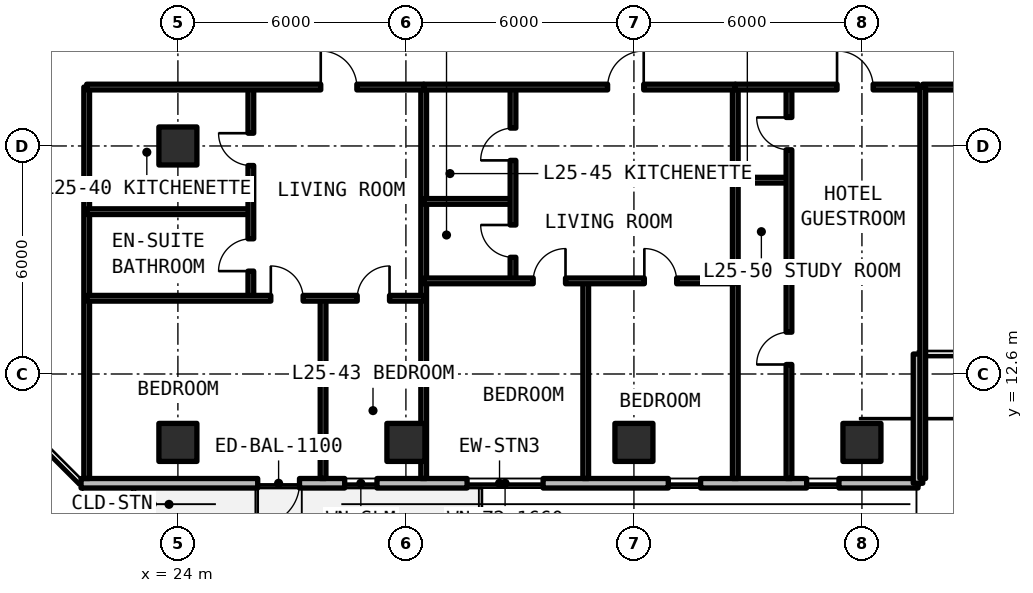
"""IFC4 building model, lengths in metres.
Left out: names, types, materials, properties, quantities, classifications, styles, units other than length and angle.
Written with IfcOpenShell. Run it as: python <this file> out.ifc"""

import sys

from ifc_helpers import new_model, si_unit, direction, frame, frame_2d, origin, origin_2d, place, context, subcontext, project, spatial, rectangle, extrude, element, fill, save


model = new_model("IFC4")
c1 = context("Model", 3, precision=1e-05, world=origin(), true_north=direction((0.0, 1.0)))
c2 = subcontext(c1, "Body", "Model", "MODEL_VIEW")
j1 = project(units=[si_unit("LENGTHUNIT", "METRE"), si_unit("PLANEANGLEUNIT", "RADIAN")], contexts=[c1])
p1 = place(None, origin())
s1 = spatial("IfcSite", under=j1, at=p1, CompositionType="ELEMENT")
p2 = place(p1, origin())
s2 = spatial("IfcBuilding", under=s1, at=p2, CompositionType="ELEMENT")
p3 = place(p2, frame((0.0, 0.0, 92.07)))
s3 = spatial("IfcBuildingStorey", under=s2, at=p3, CompositionType="ELEMENT", Elevation=92.07)
for number, where, z_axis, x_axis in (
    (1, (24.0, 18.6, 0.0), (0.0, 0.0, 1.0), (1.0, 0.0, 0.0)),
    (2, (24.0, 10.8, 0.0), (0.0, 0.0, 1.0), (1.0, 0.0, 0.0)),
    (3, (30.0, 10.8, 0.0), (0.0, 0.0, 1.0), (1.0, 0.0, 0.0)),
    (4, (36.0, 10.8, 0.0), (0.0, 0.0, 1.0), (1.0, 0.0, 0.0)),
    (5, (42.0, 10.8, 0.0), (0.0, 0.0, 1.0), (1.0, 0.0, 0.0)),
):
    element("IfcColumn", number, at=place(p3, frame(where, z_axis=z_axis, x_axis=x_axis)), inside=s3, PredefinedType="COLUMN", context=c2, shape_type="SweptSolid", body=[
        extrude(rectangle(XDim=1.0, YDim=1.0, at=origin_2d()), origin(), (0.0, 0.0, 1.0), 3.3),
    ])
p4 = place(p3, frame((21.452, 9.725, 0.0), z_axis=(0.0, 0.0, 1.0), x_axis=(1.0, 0.0, 0.0)))
e6 = element("IfcWall", 6, at=p4, inside=s3, PredefinedType="SOLIDWALL", context=c2, shape_type="SweptSolid", body=[
    extrude(rectangle(XDim=22.023, YDim=0.25, at=frame_2d((11.012, 0.0))), origin(), (0.0, 0.0, 1.0), 3.08),
])
p5 = place(p4, frame((4.648, 0.0, 0.0)))
e7 = element("IfcOpeningElement", 7, at=p5, cuts=e6, PredefinedType="OPENING", context=c2, shape_type="SweptSolid", body=[
    extrude(rectangle(XDim=1.1, YDim=2.15, at=frame_2d((0.55, 1.075))), frame((0.0, 0.135, 0.0), z_axis=(0.0, -1.0, 0.0), x_axis=(1.0, 0.0, 0.0)), (0.0, 0.0, 1.0), 0.27),
])
p6 = place(p4, frame((6.937, 0.0, 0.78)))
e8 = element("IfcOpeningElement", 8, at=p6, cuts=e6, PredefinedType="OPENING", context=c2, shape_type="SweptSolid", body=[
    extrude(rectangle(XDim=0.85, YDim=1.65, at=frame_2d((0.425, 0.825))), frame((0.0, 0.135, 0.0), z_axis=(0.0, -1.0, 0.0), x_axis=(1.0, 0.0, 0.0)), (0.0, 0.0, 1.0), 0.27),
])
p7 = place(p4, frame((10.158, 0.0, 0.78)))
e9 = element("IfcOpeningElement", 9, at=p7, cuts=e6, PredefinedType="OPENING", context=c2, shape_type="SweptSolid", body=[
    extrude(rectangle(XDim=2.0, YDim=1.66, at=frame_2d((1.0, 0.83))), frame((0.0, 0.135, 0.0), z_axis=(0.0, -1.0, 0.0), x_axis=(1.0, 0.0, 0.0)), (0.0, 0.0, 1.0), 0.27),
])
p8 = place(p4, frame((15.453, 0.0, 0.78)))
e10 = element("IfcOpeningElement", 10, at=p8, cuts=e6, PredefinedType="OPENING", context=c2, shape_type="SweptSolid", body=[
    extrude(rectangle(XDim=0.85, YDim=1.65, at=frame_2d((0.425, 0.825))), frame((0.0, 0.135, 0.0), z_axis=(0.0, -1.0, 0.0), x_axis=(1.0, 0.0, 0.0)), (0.0, 0.0, 1.0), 0.27),
])
p9 = place(p4, frame((19.093, 0.0, 0.78)))
e11 = element("IfcOpeningElement", 11, at=p9, cuts=e6, PredefinedType="OPENING", context=c2, shape_type="SweptSolid", body=[
    extrude(rectangle(XDim=0.85, YDim=1.65, at=frame_2d((0.425, 0.825))), frame((0.0, 0.135, 0.0), z_axis=(0.0, -1.0, 0.0), x_axis=(1.0, 0.0, 0.0)), (0.0, 0.0, 1.0), 0.27),
])
p10 = place(p3, frame((43.475, 9.725, 0.0), z_axis=(0.0, 0.0, 1.0), x_axis=(0.0, 1.0, 0.0)))
e12 = element("IfcWall", 12, at=p10, inside=s3, PredefinedType="SOLIDWALL", context=c2, shape_type="SweptSolid", body=[
    extrude(rectangle(XDim=3.4, YDim=0.25, at=frame_2d((1.7, 0.0))), origin(), (0.0, 0.0, 1.0), 3.08),
])
p11 = place(p3, frame((43.6, 20.15, 0.0), z_axis=(0.0, 0.0, 1.0), x_axis=(1.0, 0.0, 0.0)))
e13 = element("IfcWall", 13, at=p11, inside=s3, PredefinedType="SOLIDWALL", context=c2, shape_type="SweptSolid", body=[
    extrude(rectangle(XDim=8.4, YDim=0.15, at=frame_2d((4.2, 0.0))), origin(), (0.0, 0.0, 1.0), 2.35),
])
p12 = place(p11, frame((3.65, 0.0, 0.0)))
e14 = element("IfcOpeningElement", 14, at=p12, cuts=e13, PredefinedType="OPENING", context=c2, shape_type="SweptSolid", body=[
    extrude(rectangle(XDim=1.1, YDim=2.15, at=frame_2d((0.55, 1.075))), frame((0.0, 0.085, 0.0), z_axis=(0.0, -1.0, 0.0), x_axis=(1.0, 0.0, 0.0)), (0.0, 0.0, 1.0), 0.17),
])
for number, where, z_axis, x_axis in (
    (15, (43.6, 9.85, 0.0), (0.0, 0.0, 1.0), (0.0, 1.0, 0.0)),
    (16, (21.6, 9.85, 0.0), (0.0, 0.0, 1.0), (0.0, 1.0, 0.0)),
    (17, (30.468, 9.85, 0.0), (0.0, 0.0, 1.0), (0.0, 1.0, 0.0)),
):
    element("IfcWall", number, at=place(p3, frame(where, z_axis=z_axis, x_axis=x_axis)), inside=s3, PredefinedType="SOLIDWALL", context=c2, shape_type="SweptSolid", body=[
        extrude(rectangle(XDim=10.3, YDim=0.15, at=frame_2d((5.15, 0.0))), origin(), (0.0, 0.0, 1.0), 2.35),
    ])
p13 = place(p3, frame((21.6, 16.871, 0.0), z_axis=(0.0, 0.0, 1.0), x_axis=(1.0, 0.0, 0.0)))
e18 = element("IfcWall", 18, at=p13, inside=s3, PredefinedType="PARTITIONING", context=c2, shape_type="SweptSolid", body=[
    extrude(rectangle(XDim=4.32, YDim=0.15, at=frame_2d((2.16, 0.0))), origin(), (0.0, 0.0, 1.0), 2.35),
])
p14 = place(p3, frame((25.92, 14.593, 0.0), z_axis=(0.0, 0.0, 1.0), x_axis=(0.0, 1.0, 0.0)))
e19 = element("IfcWall", 19, at=p14, inside=s3, PredefinedType="PARTITIONING", context=c2, shape_type="SweptSolid", body=[
    extrude(rectangle(XDim=5.557, YDim=0.15, at=frame_2d((2.779, 0.0))), origin(), (0.0, 0.0, 1.0), 2.35),
])
p15 = place(p14, frame((0.714, 0.0, 0.0)))
e20 = element("IfcOpeningElement", 20, at=p15, cuts=e19, PredefinedType="OPENING", context=c2, shape_type="SweptSolid", body=[
    extrude(rectangle(XDim=0.85, YDim=2.1, at=frame_2d((0.425, 1.05))), frame((0.0, 0.085, 0.0), z_axis=(0.0, -1.0, 0.0), x_axis=(1.0, 0.0, 0.0)), (0.0, 0.0, 1.0), 0.17),
])
p16 = place(p14, frame((3.493, 0.0, 0.0)))
e21 = element("IfcOpeningElement", 21, at=p16, cuts=e19, PredefinedType="OPENING", context=c2, shape_type="SweptSolid", body=[
    extrude(rectangle(XDim=0.85, YDim=2.1, at=frame_2d((0.425, 1.05))), frame((0.0, 0.085, 0.0), z_axis=(0.0, -1.0, 0.0), x_axis=(1.0, 0.0, 0.0)), (0.0, 0.0, 1.0), 0.17),
])
p17 = place(p3, frame((27.82, 9.85, 0.0), z_axis=(0.0, 0.0, 1.0), x_axis=(0.0, 1.0, 0.0)))
e22 = element("IfcWall", 22, at=p17, inside=s3, PredefinedType="PARTITIONING", context=c2, shape_type="SweptSolid", body=[
    extrude(rectangle(XDim=4.743, YDim=0.15, at=frame_2d((2.371, 0.0))), origin(), (0.0, 0.0, 1.0), 2.35),
])
p18 = place(p3, frame((21.6, 14.593, 0.0), z_axis=(0.0, 0.0, 1.0), x_axis=(1.0, 0.0, 0.0)))
e23 = element("IfcWall", 23, at=p18, inside=s3, PredefinedType="PARTITIONING", context=c2, shape_type="SweptSolid", body=[
    extrude(rectangle(XDim=8.868, YDim=0.15, at=frame_2d((4.434, 0.0))), origin(), (0.0, 0.0, 1.0), 2.35),
])
p19 = place(p18, frame((4.845, 0.0, 0.0)))
e24 = element("IfcOpeningElement", 24, at=p19, cuts=e23, PredefinedType="OPENING", context=c2, shape_type="SweptSolid", body=[
    extrude(rectangle(XDim=0.85, YDim=2.1, at=frame_2d((0.425, 1.05))), frame((0.0, 0.085, 0.0), z_axis=(0.0, -1.0, 0.0), x_axis=(1.0, 0.0, 0.0)), (0.0, 0.0, 1.0), 0.17),
])
p20 = place(p18, frame((7.119, 0.0, 0.0)))
e25 = element("IfcOpeningElement", 25, at=p20, cuts=e23, PredefinedType="OPENING", context=c2, shape_type="SweptSolid", body=[
    extrude(rectangle(XDim=0.85, YDim=2.1, at=frame_2d((0.425, 1.05))), frame((0.0, 0.085, 0.0), z_axis=(0.0, -1.0, 0.0), x_axis=(1.0, 0.0, 0.0)), (0.0, 0.0, 1.0), 0.17),
])
p21 = place(p3, frame((21.6, 20.15, 0.0), z_axis=(0.0, 0.0, 1.0), x_axis=(1.0, 0.0, 0.0)))
e26 = element("IfcWall", 26, at=p21, inside=s3, PredefinedType="SOLIDWALL", context=c2, shape_type="SweptSolid", body=[
    extrude(rectangle(XDim=8.868, YDim=0.15, at=frame_2d((4.434, 0.0))), origin(), (0.0, 0.0, 1.0), 2.35),
])
p22 = place(p21, frame((6.159, 0.0, 0.0)))
e27 = element("IfcOpeningElement", 27, at=p22, cuts=e26, PredefinedType="OPENING", context=c2, shape_type="SweptSolid", body=[
    extrude(rectangle(XDim=0.95, YDim=2.15, at=frame_2d((0.475, 1.075))), frame((0.0, 0.085, 0.0), z_axis=(0.0, -1.0, 0.0), x_axis=(1.0, 0.0, 0.0)), (0.0, 0.0, 1.0), 0.17),
])
p23 = place(p3, frame((38.667, 9.85, 0.0), z_axis=(0.0, 0.0, 1.0), x_axis=(0.0, 1.0, 0.0)))
e28 = element("IfcWall", 28, at=p23, inside=s3, PredefinedType="SOLIDWALL", context=c2, shape_type="SweptSolid", body=[
    extrude(rectangle(XDim=10.3, YDim=0.15, at=frame_2d((5.15, 0.0))), origin(), (0.0, 0.0, 1.0), 2.35),
])
p24 = place(p3, frame((30.468, 17.141, 0.0), z_axis=(0.0, 0.0, 1.0), x_axis=(1.0, 0.0, 0.0)))
e29 = element("IfcWall", 29, at=p24, inside=s3, PredefinedType="PARTITIONING", context=c2, shape_type="SweptSolid", body=[
    extrude(rectangle(XDim=2.35, YDim=0.15, at=frame_2d((1.175, 0.0))), origin(), (0.0, 0.0, 1.0), 2.35),
])
p25 = place(p3, frame((32.818, 15.05, 0.0), z_axis=(0.0, 0.0, 1.0), x_axis=(0.0, 1.0, 0.0)))
e30 = element("IfcWall", 30, at=p25, inside=s3, PredefinedType="PARTITIONING", context=c2, shape_type="SweptSolid", body=[
    extrude(rectangle(XDim=5.1, YDim=0.15, at=frame_2d((2.55, 0.0))), origin(), (0.0, 0.0, 1.0), 2.35),
])
p26 = place(p25, frame((0.621, 0.0, 0.0)))
e31 = element("IfcOpeningElement", 31, at=p26, cuts=e30, PredefinedType="OPENING", context=c2, shape_type="SweptSolid", body=[
    extrude(rectangle(XDim=0.85, YDim=2.1, at=frame_2d((0.425, 1.05))), frame((0.0, 0.085, 0.0), z_axis=(0.0, -1.0, 0.0), x_axis=(1.0, 0.0, 0.0)), (0.0, 0.0, 1.0), 0.17),
])
p27 = place(p25, frame((3.17, 0.0, 0.0)))
e32 = element("IfcOpeningElement", 32, at=p27, cuts=e30, PredefinedType="OPENING", context=c2, shape_type="SweptSolid", body=[
    extrude(rectangle(XDim=0.85, YDim=2.1, at=frame_2d((0.425, 1.05))), frame((0.0, 0.085, 0.0), z_axis=(0.0, -1.0, 0.0), x_axis=(1.0, 0.0, 0.0)), (0.0, 0.0, 1.0), 0.17),
])
p28 = place(p3, frame((34.732, 9.85, 0.0), z_axis=(0.0, 0.0, 1.0), x_axis=(0.0, 1.0, 0.0)))
e33 = element("IfcWall", 33, at=p28, inside=s3, PredefinedType="PARTITIONING", context=c2, shape_type="SweptSolid", body=[
    extrude(rectangle(XDim=5.2, YDim=0.15, at=frame_2d((2.6, 0.0))), origin(), (0.0, 0.0, 1.0), 2.35),
])
p29 = place(p3, frame((30.468, 15.05, 0.0), z_axis=(0.0, 0.0, 1.0), x_axis=(1.0, 0.0, 0.0)))
e34 = element("IfcWall", 34, at=p29, inside=s3, PredefinedType="PARTITIONING", context=c2, shape_type="SweptSolid", body=[
    extrude(rectangle(XDim=8.199, YDim=0.15, at=frame_2d((4.1, 0.0))), origin(), (0.0, 0.0, 1.0), 2.35),
])
p30 = place(p29, frame((2.882, 0.0, 0.0)))
e35 = element("IfcOpeningElement", 35, at=p30, cuts=e34, PredefinedType="OPENING", context=c2, shape_type="SweptSolid", body=[
    extrude(rectangle(XDim=0.85, YDim=2.1, at=frame_2d((0.425, 1.05))), frame((0.0, 0.085, 0.0), z_axis=(0.0, -1.0, 0.0), x_axis=(1.0, 0.0, 0.0)), (0.0, 0.0, 1.0), 0.17),
])
p31 = place(p29, frame((5.806, 0.0, 0.0)))
e36 = element("IfcOpeningElement", 36, at=p31, cuts=e34, PredefinedType="OPENING", context=c2, shape_type="SweptSolid", body=[
    extrude(rectangle(XDim=0.85, YDim=2.1, at=frame_2d((0.425, 1.05))), frame((0.0, 0.085, 0.0), z_axis=(0.0, -1.0, 0.0), x_axis=(1.0, 0.0, 0.0)), (0.0, 0.0, 1.0), 0.17),
])
p32 = place(p3, frame((30.468, 20.15, 0.0), z_axis=(0.0, 0.0, 1.0), x_axis=(1.0, 0.0, 0.0)))
e37 = element("IfcWall", 37, at=p32, inside=s3, PredefinedType="SOLIDWALL", context=c2, shape_type="SweptSolid", body=[
    extrude(rectangle(XDim=8.199, YDim=0.15, at=frame_2d((4.1, 0.0))), origin(), (0.0, 0.0, 1.0), 2.35),
])
p33 = place(p32, frame((4.84, 0.0, 0.0)))
e38 = element("IfcOpeningElement", 38, at=p33, cuts=e37, PredefinedType="OPENING", context=c2, shape_type="SweptSolid", body=[
    extrude(rectangle(XDim=0.95, YDim=2.15, at=frame_2d((0.475, 1.075))), frame((0.0, 0.085, 0.0), z_axis=(0.0, -1.0, 0.0), x_axis=(1.0, 0.0, 0.0)), (0.0, 0.0, 1.0), 0.17),
])
p34 = place(p3, frame((38.667, 17.7, 0.0), z_axis=(0.0, 0.0, 1.0), x_axis=(1.0, 0.0, 0.0)))
e39 = element("IfcWall", 39, at=p34, inside=s3, PredefinedType="PARTITIONING", context=c2, shape_type="SweptSolid", body=[
    extrude(rectangle(XDim=1.413, YDim=0.15, at=frame_2d((0.707, 0.0))), origin(), (0.0, 0.0, 1.0), 2.35),
])
p35 = place(p3, frame((40.08, 9.85, 0.0), z_axis=(0.0, 0.0, 1.0), x_axis=(0.0, 1.0, 0.0)))
e40 = element("IfcWall", 40, at=p35, inside=s3, PredefinedType="PARTITIONING", context=c2, shape_type="SweptSolid", body=[
    extrude(rectangle(XDim=10.3, YDim=0.15, at=frame_2d((5.15, 0.0))), origin(), (0.0, 0.0, 1.0), 2.35),
])
p36 = place(p35, frame((3.0, 0.0, 0.0)))
e41 = element("IfcOpeningElement", 41, at=p36, cuts=e40, PredefinedType="OPENING", context=c2, shape_type="SweptSolid", body=[
    extrude(rectangle(XDim=0.85, YDim=2.1, at=frame_2d((0.425, 1.05))), frame((0.0, 0.085, 0.0), z_axis=(0.0, -1.0, 0.0), x_axis=(1.0, 0.0, 0.0)), (0.0, 0.0, 1.0), 0.17),
])
p37 = place(p35, frame((8.65, 0.0, 0.0)))
e42 = element("IfcOpeningElement", 42, at=p37, cuts=e40, PredefinedType="OPENING", context=c2, shape_type="SweptSolid", body=[
    extrude(rectangle(XDim=0.85, YDim=2.1, at=frame_2d((0.425, 1.05))), frame((0.0, 0.085, 0.0), z_axis=(0.0, -1.0, 0.0), x_axis=(1.0, 0.0, 0.0)), (0.0, 0.0, 1.0), 0.17),
])
p38 = place(p3, frame((38.667, 20.15, 0.0), z_axis=(0.0, 0.0, 1.0), x_axis=(1.0, 0.0, 0.0)))
e43 = element("IfcWall", 43, at=p38, inside=s3, PredefinedType="SOLIDWALL", context=c2, shape_type="SweptSolid", body=[
    extrude(rectangle(XDim=4.813, YDim=0.15, at=frame_2d((2.406, 0.0))), origin(), (0.0, 0.0, 1.0), 2.35),
])
p39 = place(p38, frame((2.678, 0.0, 0.0)))
e44 = element("IfcOpeningElement", 44, at=p39, cuts=e43, PredefinedType="OPENING", context=c2, shape_type="SweptSolid", body=[
    extrude(rectangle(XDim=0.95, YDim=2.15, at=frame_2d((0.475, 1.075))), frame((0.0, 0.085, 0.0), z_axis=(0.0, -1.0, 0.0), x_axis=(1.0, 0.0, 0.0)), (0.0, 0.0, 1.0), 0.17),
])
p40 = place(p5, frame((1.1, 0.0, 0.0), z_axis=(0.0, 0.0, 1.0), x_axis=(-1.0, 0.0, 0.0)))
e45 = element("IfcDoor", 45, at=p40, inside=s3, OperationType="SINGLE_SWING_RIGHT", PredefinedType="DOOR", context=c2, shape_type="SweptSolid", body=[
    extrude(rectangle(XDim=1.1, YDim=2.15, at=frame_2d((0.55, 1.075))), frame((0.0, 0.025, 0.0), z_axis=(0.0, -1.0, 0.0), x_axis=(1.0, 0.0, 0.0)), (0.0, 0.0, 1.0), 0.05),
])
fill(e7, e45)
p41 = place(p6, origin())
e46 = element("IfcWindow", 46, at=p41, inside=s3, PartitioningType="SINGLE_PANEL", PredefinedType="WINDOW", context=c2, shape_type="SweptSolid", body=[
    extrude(rectangle(XDim=0.85, YDim=1.65, at=frame_2d((0.425, 0.825))), frame((0.0, 0.03, 0.0), z_axis=(0.0, -1.0, 0.0), x_axis=(1.0, 0.0, 0.0)), (0.0, 0.0, 1.0), 0.06),
])
fill(e8, e46)
p42 = place(p7, origin())
e47 = element("IfcWindow", 47, at=p42, inside=s3, PartitioningType="SINGLE_PANEL", PredefinedType="WINDOW", context=c2, shape_type="SweptSolid", body=[
    extrude(rectangle(XDim=2.0, YDim=1.66, at=frame_2d((1.0, 0.83))), frame((0.0, 0.03, 0.0), z_axis=(0.0, -1.0, 0.0), x_axis=(1.0, 0.0, 0.0)), (0.0, 0.0, 1.0), 0.06),
])
fill(e9, e47)
p43 = place(p8, origin())
e48 = element("IfcWindow", 48, at=p43, inside=s3, PartitioningType="SINGLE_PANEL", PredefinedType="WINDOW", context=c2, shape_type="SweptSolid", body=[
    extrude(rectangle(XDim=0.85, YDim=1.65, at=frame_2d((0.425, 0.825))), frame((0.0, 0.03, 0.0), z_axis=(0.0, -1.0, 0.0), x_axis=(1.0, 0.0, 0.0)), (0.0, 0.0, 1.0), 0.06),
])
fill(e10, e48)
p44 = place(p9, origin())
e49 = element("IfcWindow", 49, at=p44, inside=s3, PartitioningType="SINGLE_PANEL", PredefinedType="WINDOW", context=c2, shape_type="SweptSolid", body=[
    extrude(rectangle(XDim=0.85, YDim=1.65, at=frame_2d((0.425, 0.825))), frame((0.0, 0.03, 0.0), z_axis=(0.0, -1.0, 0.0), x_axis=(1.0, 0.0, 0.0)), (0.0, 0.0, 1.0), 0.06),
])
fill(e11, e49)
p45 = place(p15, origin())
e50 = element("IfcDoor", 50, at=p45, inside=s3, OperationType="SINGLE_SWING_LEFT", PredefinedType="DOOR", context=c2, shape_type="SweptSolid", body=[
    extrude(rectangle(XDim=0.85, YDim=2.1, at=frame_2d((0.425, 1.05))), frame((0.0, 0.025, 0.0), z_axis=(0.0, -1.0, 0.0), x_axis=(1.0, 0.0, 0.0)), (0.0, 0.0, 1.0), 0.05),
])
fill(e20, e50)
p46 = place(p16, origin())
e51 = element("IfcDoor", 51, at=p46, inside=s3, OperationType="SINGLE_SWING_RIGHT", PredefinedType="DOOR", context=c2, shape_type="SweptSolid", body=[
    extrude(rectangle(XDim=0.85, YDim=2.1, at=frame_2d((0.425, 1.05))), frame((0.0, 0.025, 0.0), z_axis=(0.0, -1.0, 0.0), x_axis=(1.0, 0.0, 0.0)), (0.0, 0.0, 1.0), 0.05),
])
fill(e21, e51)
p47 = place(p19, origin())
e52 = element("IfcDoor", 52, at=p47, inside=s3, OperationType="SINGLE_SWING_LEFT", PredefinedType="DOOR", context=c2, shape_type="SweptSolid", body=[
    extrude(rectangle(XDim=0.85, YDim=2.1, at=frame_2d((0.425, 1.05))), frame((0.0, 0.025, 0.0), z_axis=(0.0, -1.0, 0.0), x_axis=(1.0, 0.0, 0.0)), (0.0, 0.0, 1.0), 0.05),
])
fill(e24, e52)
p48 = place(p20, origin())
e53 = element("IfcDoor", 53, at=p48, inside=s3, OperationType="SINGLE_SWING_RIGHT", PredefinedType="DOOR", context=c2, shape_type="SweptSolid", body=[
    extrude(rectangle(XDim=0.85, YDim=2.1, at=frame_2d((0.425, 1.05))), frame((0.0, 0.025, 0.0), z_axis=(0.0, -1.0, 0.0), x_axis=(1.0, 0.0, 0.0)), (0.0, 0.0, 1.0), 0.05),
])
fill(e25, e53)
p49 = place(p22, origin())
e54 = element("IfcDoor", 54, at=p49, inside=s3, OperationType="SINGLE_SWING_LEFT", PredefinedType="DOOR", context=c2, shape_type="SweptSolid", body=[
    extrude(rectangle(XDim=0.95, YDim=2.15, at=frame_2d((0.475, 1.075))), frame((0.0, 0.025, 0.0), z_axis=(0.0, -1.0, 0.0), x_axis=(1.0, 0.0, 0.0)), (0.0, 0.0, 1.0), 0.05),
])
fill(e27, e54)
p50 = place(p26, origin())
e55 = element("IfcDoor", 55, at=p50, inside=s3, OperationType="SINGLE_SWING_RIGHT", PredefinedType="DOOR", context=c2, shape_type="SweptSolid", body=[
    extrude(rectangle(XDim=0.85, YDim=2.1, at=frame_2d((0.425, 1.05))), frame((0.0, 0.025, 0.0), z_axis=(0.0, -1.0, 0.0), x_axis=(1.0, 0.0, 0.0)), (0.0, 0.0, 1.0), 0.05),
])
fill(e31, e55)
p51 = place(p27, origin())
e56 = element("IfcDoor", 56, at=p51, inside=s3, OperationType="SINGLE_SWING_LEFT", PredefinedType="DOOR", context=c2, shape_type="SweptSolid", body=[
    extrude(rectangle(XDim=0.85, YDim=2.1, at=frame_2d((0.425, 1.05))), frame((0.0, 0.025, 0.0), z_axis=(0.0, -1.0, 0.0), x_axis=(1.0, 0.0, 0.0)), (0.0, 0.0, 1.0), 0.05),
])
fill(e32, e56)
p52 = place(p30, origin())
e57 = element("IfcDoor", 57, at=p52, inside=s3, OperationType="SINGLE_SWING_RIGHT", PredefinedType="DOOR", context=c2, shape_type="SweptSolid", body=[
    extrude(rectangle(XDim=0.85, YDim=2.1, at=frame_2d((0.425, 1.05))), frame((0.0, 0.025, 0.0), z_axis=(0.0, -1.0, 0.0), x_axis=(1.0, 0.0, 0.0)), (0.0, 0.0, 1.0), 0.05),
])
fill(e35, e57)
p53 = place(p31, origin())
e58 = element("IfcDoor", 58, at=p53, inside=s3, OperationType="SINGLE_SWING_LEFT", PredefinedType="DOOR", context=c2, shape_type="SweptSolid", body=[
    extrude(rectangle(XDim=0.85, YDim=2.1, at=frame_2d((0.425, 1.05))), frame((0.0, 0.025, 0.0), z_axis=(0.0, -1.0, 0.0), x_axis=(1.0, 0.0, 0.0)), (0.0, 0.0, 1.0), 0.05),
])
fill(e36, e58)
p54 = place(p33, origin())
e59 = element("IfcDoor", 59, at=p54, inside=s3, OperationType="SINGLE_SWING_RIGHT", PredefinedType="DOOR", context=c2, shape_type="SweptSolid", body=[
    extrude(rectangle(XDim=0.95, YDim=2.15, at=frame_2d((0.475, 1.075))), frame((0.0, 0.025, 0.0), z_axis=(0.0, -1.0, 0.0), x_axis=(1.0, 0.0, 0.0)), (0.0, 0.0, 1.0), 0.05),
])
fill(e38, e59)
p55 = place(p36, origin())
e60 = element("IfcDoor", 60, at=p55, inside=s3, OperationType="SINGLE_SWING_LEFT", PredefinedType="DOOR", context=c2, shape_type="SweptSolid", body=[
    extrude(rectangle(XDim=0.85, YDim=2.1, at=frame_2d((0.425, 1.05))), frame((0.0, 0.025, 0.0), z_axis=(0.0, -1.0, 0.0), x_axis=(1.0, 0.0, 0.0)), (0.0, 0.0, 1.0), 0.05),
])
fill(e41, e60)
p56 = place(p37, origin())
e61 = element("IfcDoor", 61, at=p56, inside=s3, OperationType="SINGLE_SWING_RIGHT", PredefinedType="DOOR", context=c2, shape_type="SweptSolid", body=[
    extrude(rectangle(XDim=0.85, YDim=2.1, at=frame_2d((0.425, 1.05))), frame((0.0, 0.025, 0.0), z_axis=(0.0, -1.0, 0.0), x_axis=(1.0, 0.0, 0.0)), (0.0, 0.0, 1.0), 0.05),
])
fill(e42, e61)
p57 = place(p39, origin())
e62 = element("IfcDoor", 62, at=p57, inside=s3, OperationType="SINGLE_SWING_LEFT", PredefinedType="DOOR", context=c2, shape_type="SweptSolid", body=[
    extrude(rectangle(XDim=0.95, YDim=2.15, at=frame_2d((0.475, 1.075))), frame((0.0, 0.025, 0.0), z_axis=(0.0, -1.0, 0.0), x_axis=(1.0, 0.0, 0.0)), (0.0, 0.0, 1.0), 0.05),
])
fill(e44, e62)
save(model, sys.argv[1])
